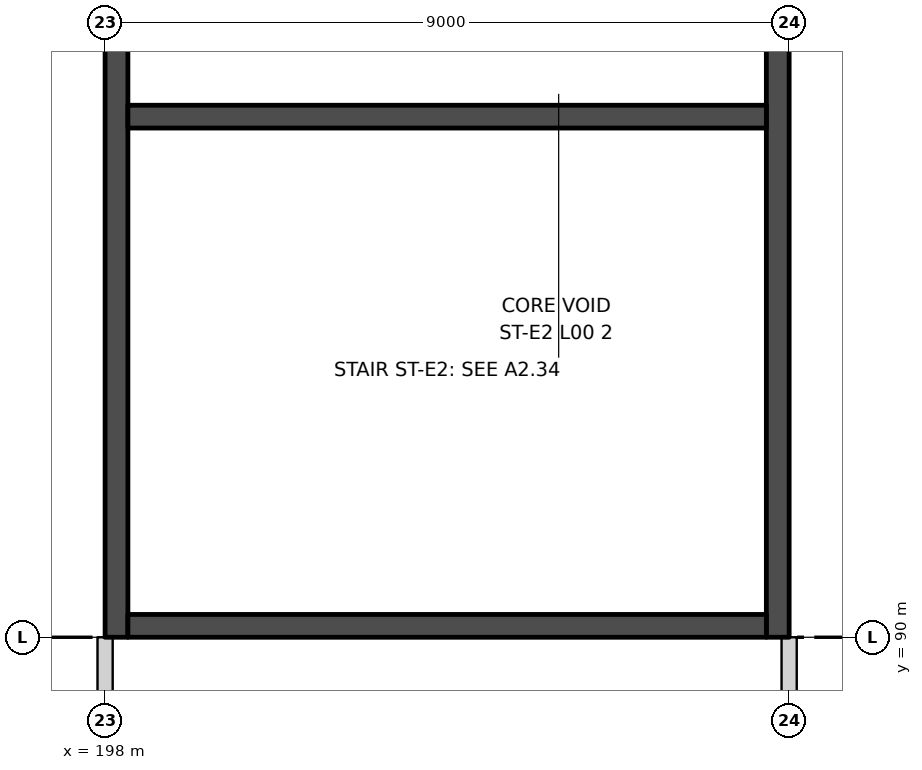
"""IFC4 building model, lengths in metres.
Left out: names, types, materials, properties, quantities, classifications, styles, units other than length and angle.
Written with IfcOpenShell. Run it as: python <this file> out.ifc"""

import sys

from ifc_helpers import new_model, si_unit, direction, frame, frame_2d, origin, place, context, subcontext, project, spatial, rectangle, extrude, element, save


model = new_model("IFC4")
c1 = context("Model", 3, precision=1e-05, world=origin(), true_north=direction((0.0, 1.0)))
c2 = subcontext(c1, "Body", "Model", "MODEL_VIEW")
j1 = project(units=[si_unit("LENGTHUNIT", "METRE"), si_unit("PLANEANGLEUNIT", "RADIAN")], contexts=[c1])
p1 = place(None, origin())
s1 = spatial("IfcSite", under=j1, at=p1, CompositionType="ELEMENT")
p2 = place(p1, origin())
s2 = spatial("IfcBuilding", under=s1, at=p2, CompositionType="ELEMENT")
p3 = place(p2, origin())
s3 = spatial("IfcBuildingStorey", under=s2, at=p3, CompositionType="ELEMENT", Elevation=0.0)
p4 = place(p3, frame((198.0, 81.45, 0.0), z_axis=(0.0, 0.0, 1.0), x_axis=(0.0, 1.0, 0.0)))
e1 = element("IfcWall", 1, at=p4, inside=s3, PredefinedType="PARTITIONING", context=c2, shape_type="SweptSolid", body=[
    extrude(rectangle(XDim=8.55, YDim=0.2, at=frame_2d((4.275, 0.0))), origin(), (0.0, 0.0, 1.0), 5.65),
])
p5 = place(p4, frame((3.375, 0.0, 0.0)))
e2 = element("IfcOpeningElement", 2, at=p5, cuts=e1, PredefinedType="OPENING", context=c2, shape_type="SweptSolid", body=[
    extrude(rectangle(XDim=1.8, YDim=2.1, at=frame_2d((0.9, 1.05))), frame((0.0, 0.11, 0.0), z_axis=(0.0, -1.0, 0.0), x_axis=(1.0, 0.0, 0.0)), (0.0, 0.0, 1.0), 0.22),
])
p6 = place(p3, frame((207.0, 81.5, 0.0), z_axis=(0.0, 0.0, 1.0), x_axis=(0.0, 1.0, 0.0)))
e3 = element("IfcWall", 3, at=p6, inside=s3, PredefinedType="PARTITIONING", context=c2, shape_type="SweptSolid", body=[
    extrude(rectangle(XDim=8.5, YDim=0.2, at=frame_2d((4.25, 0.0))), origin(), (0.0, 0.0, 1.0), 5.75),
])
p7 = place(p3, frame((198.15, 108.0, 0.0), z_axis=(0.0, 0.0, 1.0), x_axis=(0.0, -1.0, 0.0)))
e4 = element("IfcWall", 4, at=p7, inside=s3, PredefinedType="SHEAR", context=c2, shape_type="SweptSolid", body=[
    extrude(rectangle(XDim=18.0, YDim=0.3, at=frame_2d((9.0, 0.0))), origin(), (0.0, 0.0, 1.0), 7.0),
])
p8 = place(p7, frame((8.6, 0.0, 0.0)))
e5 = element("IfcOpeningElement", 5, at=p8, cuts=e4, PredefinedType="OPENING", context=c2, shape_type="SweptSolid", body=[
    extrude(rectangle(XDim=1.2, YDim=2.1, at=frame_2d((0.6, 1.05))), frame((0.0, 0.16, 0.0), z_axis=(0.0, -1.0, 0.0), x_axis=(1.0, 0.0, 0.0)), (0.0, 0.0, 1.0), 0.32),
])
p9 = place(p3, frame((206.85, 108.0, 0.0), z_axis=(0.0, 0.0, 1.0), x_axis=(0.0, -1.0, 0.0)))
e6 = element("IfcWall", 6, at=p9, inside=s3, PredefinedType="SHEAR", context=c2, shape_type="SweptSolid", body=[
    extrude(rectangle(XDim=18.0, YDim=0.3, at=frame_2d((9.0, 0.0))), origin(), (0.0, 0.0, 1.0), 7.0),
])
for number, where, z_axis, x_axis in (
    (7, (198.3, 90.15, 0.0), (0.0, 0.0, 1.0), (1.0, 0.0, 0.0)),
    (8, (198.3, 96.85, 0.0), (0.0, 0.0, 1.0), (1.0, 0.0, 0.0)),
):
    element("IfcWall", number, at=place(p3, frame(where, z_axis=z_axis, x_axis=x_axis)), inside=s3, PredefinedType="SHEAR", context=c2, shape_type="SweptSolid", body=[
        extrude(rectangle(XDim=8.4, YDim=0.3, at=frame_2d((4.2, 0.0))), origin(), (0.0, 0.0, 1.0), 7.0),
    ])
save(model, sys.argv[1])
